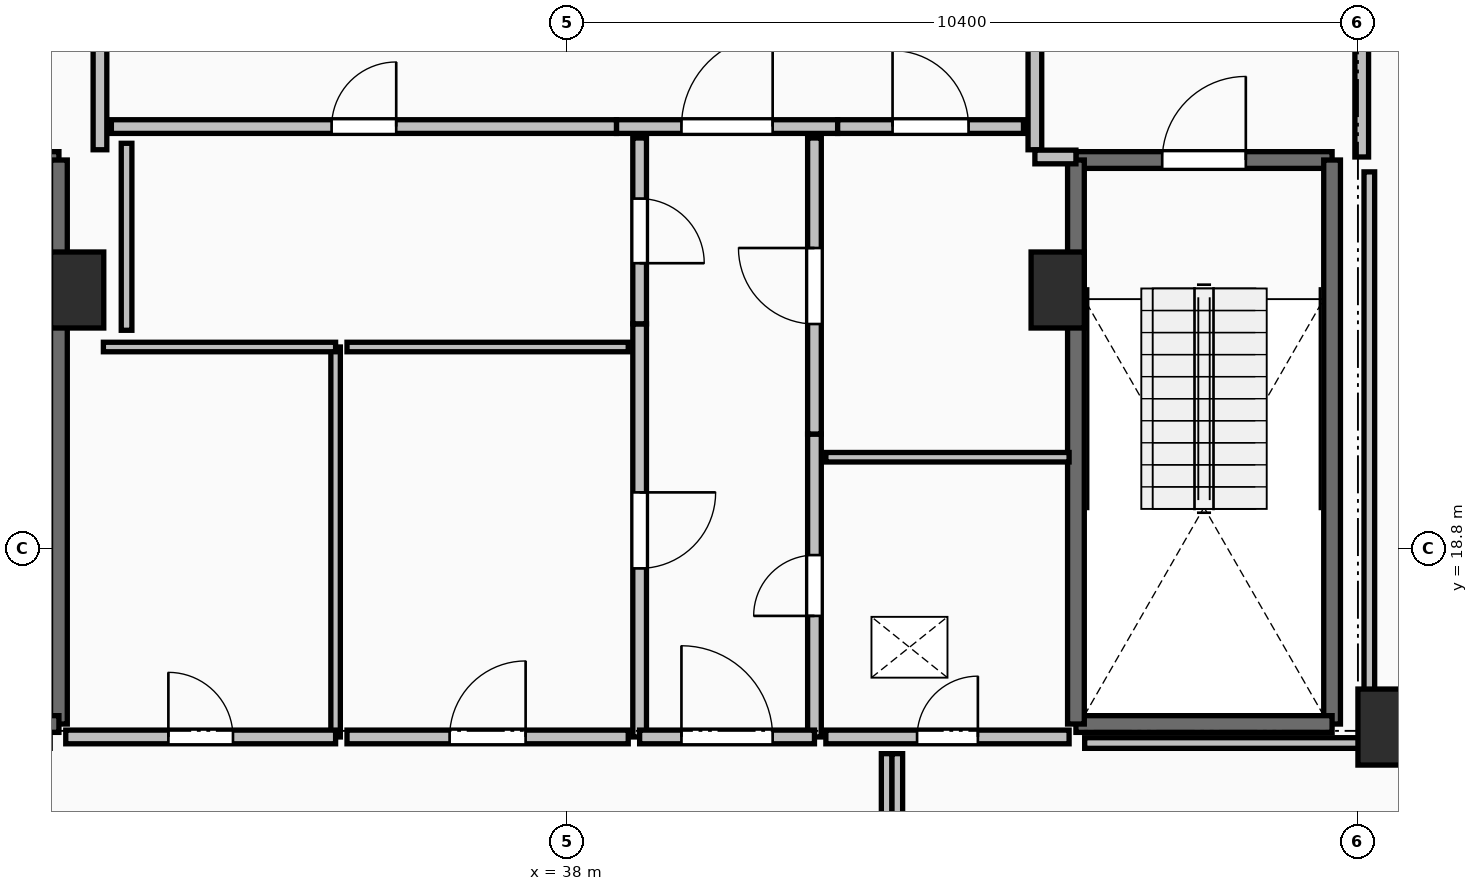
"""IFC4 building model, lengths in metres.
Left out: names, types, materials, properties, quantities, classifications, styles, units other than length and angle.
Written with IfcOpenShell. Run it as: python <this file> out.ifc"""

import sys

from ifc_helpers import new_model, si_unit, direction, frame, frame_2d, origin, origin_2d, place, context, subcontext, project, spatial, rectangle, extrude, element, fill, save


model = new_model("IFC4")
c1 = context("Model", 3, precision=1e-05, world=origin(), true_north=direction((0.0, 1.0)))
c2 = subcontext(c1, "Body", "Model", "MODEL_VIEW")
j1 = project(units=[si_unit("LENGTHUNIT", "METRE"), si_unit("PLANEANGLEUNIT", "RADIAN")], contexts=[c1])
p1 = place(None, origin())
s1 = spatial("IfcSite", under=j1, at=p1, CompositionType="ELEMENT")
p2 = place(p1, origin())
s2 = spatial("IfcBuilding", under=s1, at=p2, CompositionType="ELEMENT")
p3 = place(p2, frame((0.0, 0.0, 248.45)))
s3 = spatial("IfcBuildingStorey", under=s2, at=p3, CompositionType="ELEMENT", Elevation=248.45)
for number, where, z_axis, x_axis in (
    (1, (31.55, 22.2, 0.0), (0.0, 0.0, 1.0), (1.0, 0.0, 0.0)),
    (2, (48.75, 16.45, 0.0), (0.0, 0.0, 1.0), (1.0, 0.0, 0.0)),
    (3, (44.45, 22.2, 0.0), (0.0, 0.0, 1.0), (1.0, 0.0, 0.0)),
):
    element("IfcColumn", number, at=place(p3, frame(where, z_axis=z_axis, x_axis=x_axis)), inside=s3, PredefinedType="PILASTER", context=c2, shape_type="SweptSolid", body=[
        extrude(rectangle(XDim=0.7, YDim=1.0, at=origin_2d()), origin(), (0.0, 0.0, 1.0), 3.55),
    ])
p4 = place(p3, frame((27.94, 23.91, 0.0), z_axis=(0.0, 0.0, 1.0), x_axis=(1.0, 0.0, 0.0)))
e4 = element("IfcWall", 4, at=p4, inside=s3, PredefinedType="SOLIDWALL", context=c2, shape_type="SweptSolid", body=[
    extrude(rectangle(XDim=3.37, YDim=0.22, at=frame_2d((1.685, 0.0))), origin(), (0.0, 0.0, 1.0), 3.29),
])
p5 = place(p4, frame((1.135, 0.0, 0.0)))
e5 = element("IfcOpeningElement", 5, at=p5, cuts=e4, PredefinedType="OPENING", context=c2, shape_type="SweptSolid", body=[
    extrude(rectangle(XDim=1.1, YDim=2.15, at=frame_2d((0.55, 1.075))), frame((0.0, 0.125, 0.0), z_axis=(0.0, -1.0, 0.0), x_axis=(1.0, 0.0, 0.0)), (0.0, 0.0, 1.0), 0.25),
])
p6 = place(p3, frame((31.31, 23.91, 0.0), z_axis=(0.0, 0.0, 1.0), x_axis=(0.0, -1.0, 0.0)))
e6 = element("IfcWall", 6, at=p6, inside=s3, PredefinedType="SOLIDWALL", context=c2, shape_type="SweptSolid", body=[
    extrude(rectangle(XDim=7.42, YDim=0.22, at=frame_2d((3.71, 0.0))), origin(), (0.0, 0.0, 1.0), 3.29),
])
p7 = place(p3, frame((31.31, 16.49, 0.0), z_axis=(0.0, 0.0, 1.0), x_axis=(-1.0, 0.0, 0.0)))
e7 = element("IfcWall", 7, at=p7, inside=s3, PredefinedType="SOLIDWALL", context=c2, shape_type="SweptSolid", body=[
    extrude(rectangle(XDim=3.37, YDim=0.22, at=frame_2d((1.685, 0.0))), origin(), (0.0, 0.0, 1.0), 3.29),
])
p8 = place(p3, frame((44.69, 23.91, 0.0), z_axis=(0.0, 0.0, 1.0), x_axis=(1.0, 0.0, 0.0)))
e8 = element("IfcWall", 8, at=p8, inside=s3, PredefinedType="SOLIDWALL", context=c2, shape_type="SweptSolid", body=[
    extrude(rectangle(XDim=3.37, YDim=0.22, at=frame_2d((1.685, 0.0))), origin(), (0.0, 0.0, 1.0), 3.29),
])
p9 = place(p8, frame((1.135, 0.0, 0.0)))
e9 = element("IfcOpeningElement", 9, at=p9, cuts=e8, PredefinedType="OPENING", context=c2, shape_type="SweptSolid", body=[
    extrude(rectangle(XDim=1.1, YDim=2.15, at=frame_2d((0.55, 1.075))), frame((0.0, 0.125, 0.0), z_axis=(0.0, -1.0, 0.0), x_axis=(1.0, 0.0, 0.0)), (0.0, 0.0, 1.0), 0.25),
])
p10 = place(p3, frame((48.06, 23.91, 0.0), z_axis=(0.0, 0.0, 1.0), x_axis=(0.0, -1.0, 0.0)))
e10 = element("IfcWall", 10, at=p10, inside=s3, PredefinedType="SOLIDWALL", context=c2, shape_type="SweptSolid", body=[
    extrude(rectangle(XDim=7.42, YDim=0.22, at=frame_2d((3.71, 0.0))), origin(), (0.0, 0.0, 1.0), 3.29),
])
p11 = place(p3, frame((48.06, 16.49, 0.0), z_axis=(0.0, 0.0, 1.0), x_axis=(-1.0, 0.0, 0.0)))
e11 = element("IfcWall", 11, at=p11, inside=s3, PredefinedType="SOLIDWALL", context=c2, shape_type="SweptSolid", body=[
    extrude(rectangle(XDim=3.37, YDim=0.22, at=frame_2d((1.685, 0.0))), origin(), (0.0, 0.0, 1.0), 3.29),
])
p12 = place(p3, frame((44.69, 16.49, 0.0), z_axis=(0.0, 0.0, 1.0), x_axis=(0.0, 1.0, 0.0)))
e12 = element("IfcWall", 12, at=p12, inside=s3, PredefinedType="SOLIDWALL", context=c2, shape_type="SweptSolid", body=[
    extrude(rectangle(XDim=7.42, YDim=0.22, at=frame_2d((3.71, 0.0))), origin(), (0.0, 0.0, 1.0), 3.29),
])
p13 = place(p3, frame((31.85, 24.045, 0.0), z_axis=(0.0, 0.0, 1.0), x_axis=(0.0, 1.0, 0.0)))
e13 = element("IfcWall", 13, at=p13, inside=s3, PredefinedType="PARTITIONING", context=c2, shape_type="SweptSolid", body=[
    extrude(rectangle(XDim=3.91, YDim=0.18, at=frame_2d((1.955, 0.0))), origin(), (0.0, 0.0, 1.0), 3.29),
])
p14 = place(p13, frame((1.355, 0.0, 0.0)))
e14 = element("IfcOpeningElement", 14, at=p14, cuts=e13, PredefinedType="OPENING", context=c2, shape_type="SweptSolid", body=[
    extrude(rectangle(XDim=1.2, YDim=2.15, at=frame_2d((0.6, 1.075))), frame((0.0, 0.105, 0.0), z_axis=(0.0, -1.0, 0.0), x_axis=(1.0, 0.0, 0.0)), (0.0, 0.0, 1.0), 0.21),
])
p15 = place(p3, frame((44.15, 27.955, 0.0), z_axis=(0.0, 0.0, 1.0), x_axis=(0.0, -1.0, 0.0)))
e15 = element("IfcWall", 15, at=p15, inside=s3, PredefinedType="PARTITIONING", context=c2, shape_type="SweptSolid", body=[
    extrude(rectangle(XDim=3.91, YDim=0.18, at=frame_2d((1.955, 0.0))), origin(), (0.0, 0.0, 1.0), 3.29),
])
p16 = place(p15, frame((1.355, 0.0, 0.0)))
e16 = element("IfcOpeningElement", 16, at=p16, cuts=e15, PredefinedType="OPENING", context=c2, shape_type="SweptSolid", body=[
    extrude(rectangle(XDim=1.2, YDim=2.15, at=frame_2d((0.6, 1.075))), frame((0.0, 0.105, 0.0), z_axis=(0.0, -1.0, 0.0), x_axis=(1.0, 0.0, 0.0)), (0.0, 0.0, 1.0), 0.21),
])
p17 = place(p3, frame((44.15, 23.95, 0.0), z_axis=(0.0, 0.0, 1.0), x_axis=(1.0, 0.0, 0.0)))
e17 = element("IfcWall", 17, at=p17, inside=s3, PredefinedType="PARTITIONING", context=c2, shape_type="SweptSolid", body=[
    extrude(rectangle(XDim=0.54, YDim=0.18, at=frame_2d((0.27, 0.0))), origin(), (0.0, 0.0, 1.0), 3.29),
])
p18 = place(p3, frame((48.45, 23.95, 0.0), z_axis=(0.0, 0.0, 1.0), x_axis=(0.0, 1.0, 0.0)))
e18 = element("IfcWall", 18, at=p18, inside=s3, PredefinedType="PARTITIONING", context=c2, shape_type="SweptSolid", body=[
    extrude(rectangle(XDim=4.05, YDim=0.18, at=frame_2d((2.025, 0.0))), origin(), (0.0, 0.0, 1.0), 3.29),
])
p19 = place(p18, frame((1.425, 0.0, 0.0)))
e19 = element("IfcOpeningElement", 19, at=p19, cuts=e18, PredefinedType="OPENING", context=c2, shape_type="SweptSolid", body=[
    extrude(rectangle(XDim=1.2, YDim=2.15, at=frame_2d((0.6, 1.075))), frame((0.0, 0.105, 0.0), z_axis=(0.0, -1.0, 0.0), x_axis=(1.0, 0.0, 0.0)), (0.0, 0.0, 1.0), 0.21),
])
p20 = place(p3, frame((38.645, 24.35, 0.0), z_axis=(0.0, 0.0, 1.0), x_axis=(1.0, 0.0, 0.0)))
e20 = element("IfcWall", 20, at=p20, inside=s3, PredefinedType="PARTITIONING", context=c2, shape_type="SweptSolid", body=[
    extrude(rectangle(XDim=2.91, YDim=0.18, at=frame_2d((1.455, 0.0))), origin(), (0.0, 0.0, 1.0), 3.29),
])
p21 = place(p20, frame((0.855, 0.0, 0.0)))
e21 = element("IfcOpeningElement", 21, at=p21, cuts=e20, PredefinedType="OPENING", context=c2, shape_type="SweptSolid", body=[
    extrude(rectangle(XDim=1.2, YDim=2.15, at=frame_2d((0.6, 1.075))), frame((0.0, 0.105, 0.0), z_axis=(0.0, -1.0, 0.0), x_axis=(1.0, 0.0, 0.0)), (0.0, 0.0, 1.0), 0.21),
])
p22 = place(p3, frame((41.555, 24.35, 0.0), z_axis=(0.0, 0.0, 1.0), x_axis=(1.0, 0.0, 0.0)))
e22 = element("IfcWall", 22, at=p22, inside=s3, PredefinedType="PARTITIONING", context=c2, shape_type="SweptSolid", body=[
    extrude(rectangle(XDim=2.445, YDim=0.18, at=frame_2d((1.223, 0.0))), origin(), (0.0, 0.0, 1.0), 3.29),
])
p23 = place(p22, frame((0.722, 0.0, 0.0)))
e23 = element("IfcOpeningElement", 23, at=p23, cuts=e22, PredefinedType="OPENING", context=c2, shape_type="SweptSolid", body=[
    extrude(rectangle(XDim=1.0, YDim=2.15, at=frame_2d((0.5, 1.075))), frame((0.0, 0.105, 0.0), z_axis=(0.0, -1.0, 0.0), x_axis=(1.0, 0.0, 0.0)), (0.0, 0.0, 1.0), 0.21),
])
p24 = place(p3, frame((32.0, 24.35, 0.0), z_axis=(0.0, 0.0, 1.0), x_axis=(1.0, 0.0, 0.0)))
e24 = element("IfcWall", 24, at=p24, inside=s3, PredefinedType="PARTITIONING", context=c2, shape_type="SweptSolid", body=[
    extrude(rectangle(XDim=6.645, YDim=0.18, at=frame_2d((3.323, 0.0))), origin(), (0.0, 0.0, 1.0), 3.29),
])
p25 = place(p24, frame((2.897, 0.0, 0.0)))
e25 = element("IfcOpeningElement", 25, at=p25, cuts=e24, PredefinedType="OPENING", context=c2, shape_type="SweptSolid", body=[
    extrude(rectangle(XDim=0.85, YDim=2.1, at=frame_2d((0.425, 1.05))), frame((0.0, 0.105, 0.0), z_axis=(0.0, -1.0, 0.0), x_axis=(1.0, 0.0, 0.0)), (0.0, 0.0, 1.0), 0.21),
])
p26 = place(p3, frame((41.25, 16.32, 0.0), z_axis=(0.0, 0.0, 1.0), x_axis=(0.0, 1.0, 0.0)))
e26 = element("IfcWall", 26, at=p26, inside=s3, PredefinedType="PARTITIONING", context=c2, shape_type="SweptSolid", body=[
    extrude(rectangle(XDim=3.985, YDim=0.18, at=frame_2d((1.992, 0.0))), origin(), (0.0, 0.0, 1.0), 3.29),
])
p27 = place(p26, frame((1.593, 0.0, 0.0)))
e27 = element("IfcOpeningElement", 27, at=p27, cuts=e26, PredefinedType="OPENING", context=c2, shape_type="SweptSolid", body=[
    extrude(rectangle(XDim=0.8, YDim=2.05, at=frame_2d((0.4, 1.025))), frame((0.0, 0.105, 0.0), z_axis=(0.0, -1.0, 0.0), x_axis=(1.0, 0.0, 0.0)), (0.0, 0.0, 1.0), 0.21),
])
p28 = place(p3, frame((41.25, 20.305, 0.0), z_axis=(0.0, 0.0, 1.0), x_axis=(0.0, 1.0, 0.0)))
e28 = element("IfcWall", 28, at=p28, inside=s3, PredefinedType="PARTITIONING", context=c2, shape_type="SweptSolid", body=[
    extrude(rectangle(XDim=3.895, YDim=0.18, at=frame_2d((1.948, 0.0))), origin(), (0.0, 0.0, 1.0), 2.482),
])
p29 = place(p28, frame((1.448, 0.0, 0.0)))
e29 = element("IfcOpeningElement", 29, at=p29, cuts=e28, PredefinedType="OPENING", context=c2, shape_type="SweptSolid", body=[
    extrude(rectangle(XDim=1.0, YDim=2.15, at=frame_2d((0.5, 1.075))), frame((0.0, 0.105, 0.0), z_axis=(0.0, -1.0, 0.0), x_axis=(1.0, 0.0, 0.0)), (0.0, 0.0, 1.0), 0.21),
])
p30 = place(p3, frame((38.95, 21.755, 0.0), z_axis=(0.0, 0.0, 1.0), x_axis=(0.0, -1.0, 0.0)))
e30 = element("IfcWall", 30, at=p30, inside=s3, PredefinedType="PARTITIONING", context=c2, shape_type="SweptSolid", body=[
    extrude(rectangle(XDim=5.435, YDim=0.18, at=frame_2d((2.717, 0.0))), origin(), (0.0, 0.0, 1.0), 3.29),
])
p31 = place(p30, frame((2.218, 0.0, 0.0)))
e31 = element("IfcOpeningElement", 31, at=p31, cuts=e30, PredefinedType="OPENING", context=c2, shape_type="SweptSolid", body=[
    extrude(rectangle(XDim=1.0, YDim=2.15, at=frame_2d((0.5, 1.075))), frame((0.0, 0.105, 0.0), z_axis=(0.0, -1.0, 0.0), x_axis=(1.0, 0.0, 0.0)), (0.0, 0.0, 1.0), 0.21),
])
p32 = place(p3, frame((38.95, 24.2, 0.0), z_axis=(0.0, 0.0, 1.0), x_axis=(0.0, -1.0, 0.0)))
e32 = element("IfcWall", 32, at=p32, inside=s3, PredefinedType="PARTITIONING", context=c2, shape_type="SweptSolid", body=[
    extrude(rectangle(XDim=2.445, YDim=0.18, at=frame_2d((1.223, 0.0))), origin(), (0.0, 0.0, 1.0), 2.482),
])
p33 = place(p32, frame((0.798, 0.0, 0.0)))
e33 = element("IfcOpeningElement", 33, at=p33, cuts=e32, PredefinedType="OPENING", context=c2, shape_type="SweptSolid", body=[
    extrude(rectangle(XDim=0.85, YDim=2.1, at=frame_2d((0.425, 1.05))), frame((0.0, 0.105, 0.0), z_axis=(0.0, -1.0, 0.0), x_axis=(1.0, 0.0, 0.0)), (0.0, 0.0, 1.0), 0.21),
])
p34 = place(p3, frame((38.95, 16.32, 0.0), z_axis=(0.0, 0.0, 1.0), x_axis=(1.0, 0.0, 0.0)))
e34 = element("IfcWall", 34, at=p34, inside=s3, PredefinedType="PARTITIONING", context=c2, shape_type="SweptSolid", body=[
    extrude(rectangle(XDim=2.3, YDim=0.18, at=frame_2d((1.15, 0.0))), origin(), (0.0, 0.0, 1.0), 3.29),
])
p35 = place(p34, frame((0.55, 0.0, 0.0)))
e35 = element("IfcOpeningElement", 35, at=p35, cuts=e34, PredefinedType="OPENING", context=c2, shape_type="SweptSolid", body=[
    extrude(rectangle(XDim=1.2, YDim=2.15, at=frame_2d((0.6, 1.075))), frame((0.0, 0.105, 0.0), z_axis=(0.0, -1.0, 0.0), x_axis=(1.0, 0.0, 0.0)), (0.0, 0.0, 1.0), 0.21),
])
p36 = place(p3, frame((44.6, 20.0, 0.0), z_axis=(0.0, 0.0, 1.0), x_axis=(-1.0, 0.0, 0.0)))
e36 = element("IfcWall", 36, at=p36, inside=s3, PredefinedType="PARTITIONING", context=c2, shape_type="SweptSolid", body=[
    extrude(rectangle(XDim=3.2, YDim=0.125, at=frame_2d((1.6, 0.0))), origin(), (0.0, 0.0, 1.0), 3.29),
])
p37 = place(p3, frame((41.4, 16.32, 0.0), z_axis=(0.0, 0.0, 1.0), x_axis=(1.0, 0.0, 0.0)))
e37 = element("IfcWall", 37, at=p37, inside=s3, PredefinedType="PARTITIONING", context=c2, shape_type="SweptSolid", body=[
    extrude(rectangle(XDim=3.2, YDim=0.18, at=frame_2d((1.6, 0.0))), origin(), (0.0, 0.0, 1.0), 3.29),
])
p38 = place(p37, frame((1.2, 0.0, 0.0)))
e38 = element("IfcOpeningElement", 38, at=p38, cuts=e37, PredefinedType="OPENING", context=c2, shape_type="SweptSolid", body=[
    extrude(rectangle(XDim=0.8, YDim=2.05, at=frame_2d((0.4, 1.025))), frame((0.0, 0.105, 0.0), z_axis=(0.0, -1.0, 0.0), x_axis=(1.0, 0.0, 0.0)), (0.0, 0.0, 1.0), 0.21),
])
p39 = place(p3, frame((34.95, 16.32, 0.0), z_axis=(0.0, 0.0, 1.0), x_axis=(0.0, 1.0, 0.0)))
e39 = element("IfcWall", 39, at=p39, inside=s3, PredefinedType="PARTITIONING", context=c2, shape_type="SweptSolid", body=[
    extrude(rectangle(XDim=5.13, YDim=0.125, at=frame_2d((2.565, 0.0))), origin(), (0.0, 0.0, 1.0), 3.29),
])
p40 = place(p3, frame((34.95, 21.45, 0.0), z_axis=(0.0, 0.0, 1.0), x_axis=(-1.0, 0.0, 0.0)))
e40 = element("IfcWall", 40, at=p40, inside=s3, PredefinedType="PARTITIONING", context=c2, shape_type="SweptSolid", body=[
    extrude(rectangle(XDim=3.055, YDim=0.125, at=frame_2d((1.527, 0.0))), origin(), (0.0, 0.0, 1.0), 3.29),
])
p41 = place(p3, frame((31.4, 16.32, 0.0), z_axis=(0.0, 0.0, 1.0), x_axis=(1.0, 0.0, 0.0)))
e41 = element("IfcWall", 41, at=p41, inside=s3, PredefinedType="PARTITIONING", context=c2, shape_type="SweptSolid", body=[
    extrude(rectangle(XDim=3.55, YDim=0.18, at=frame_2d((1.775, 0.0))), origin(), (0.0, 0.0, 1.0), 3.29),
])
p42 = place(p41, frame((1.35, 0.0, 0.0)))
e42 = element("IfcOpeningElement", 42, at=p42, cuts=e41, PredefinedType="OPENING", context=c2, shape_type="SweptSolid", body=[
    extrude(rectangle(XDim=0.85, YDim=2.1, at=frame_2d((0.425, 1.05))), frame((0.0, 0.105, 0.0), z_axis=(0.0, -1.0, 0.0), x_axis=(1.0, 0.0, 0.0)), (0.0, 0.0, 1.0), 0.21),
])
p43 = place(p3, frame((38.8, 21.45, 0.0), z_axis=(0.0, 0.0, 1.0), x_axis=(-1.0, 0.0, 0.0)))
e43 = element("IfcWall", 43, at=p43, inside=s3, PredefinedType="PARTITIONING", context=c2, shape_type="SweptSolid", body=[
    extrude(rectangle(XDim=3.7, YDim=0.125, at=frame_2d((1.85, 0.0))), origin(), (0.0, 0.0, 1.0), 3.29),
])
p44 = place(p3, frame((35.1, 16.32, 0.0), z_axis=(0.0, 0.0, 1.0), x_axis=(1.0, 0.0, 0.0)))
e44 = element("IfcWall", 44, at=p44, inside=s3, PredefinedType="PARTITIONING", context=c2, shape_type="SweptSolid", body=[
    extrude(rectangle(XDim=3.7, YDim=0.18, at=frame_2d((1.85, 0.0))), origin(), (0.0, 0.0, 1.0), 3.29),
])
p45 = place(p44, frame((1.35, 0.0, 0.0)))
e45 = element("IfcOpeningElement", 45, at=p45, cuts=e44, PredefinedType="OPENING", context=c2, shape_type="SweptSolid", body=[
    extrude(rectangle(XDim=1.0, YDim=2.15, at=frame_2d((0.5, 1.075))), frame((0.0, 0.105, 0.0), z_axis=(0.0, -1.0, 0.0), x_axis=(1.0, 0.0, 0.0)), (0.0, 0.0, 1.0), 0.21),
])
p46 = place(p3, frame((32.2, 24.13, 0.0), z_axis=(0.0, 0.0, 1.0), x_axis=(0.0, -1.0, 0.0)))
e46 = element("IfcWall", 46, at=p46, inside=s3, PredefinedType="PARTITIONING", context=c2, shape_type="SweptSolid", body=[
    extrude(rectangle(XDim=2.46, YDim=0.14, at=frame_2d((1.23, 0.0))), origin(), (0.0, 0.0, 1.0), 2.482),
])
p47 = place(p3, frame((44.805, 16.24, 0.0), z_axis=(0.0, 0.0, 1.0), x_axis=(1.0, 0.0, 0.0)))
e47 = element("IfcWall", 47, at=p47, inside=s3, PredefinedType="PARTITIONING", context=c2, shape_type="SweptSolid", body=[
    extrude(rectangle(XDim=3.745, YDim=0.14, at=frame_2d((1.873, 0.0))), origin(), (0.0, 0.0, 1.0), 2.482),
])
p48 = place(p3, frame((48.55, 16.24, 0.0), z_axis=(0.0, 0.0, 1.0), x_axis=(0.0, 1.0, 0.0)))
e48 = element("IfcWall", 48, at=p48, inside=s3, PredefinedType="PARTITIONING", context=c2, shape_type="SweptSolid", body=[
    extrude(rectangle(XDim=7.514, YDim=0.14, at=frame_2d((3.757, 0.0))), origin(), (0.0, 0.0, 1.0), 2.482),
])
for number, where, z_axis, x_axis in (
    (49, (42.2, 16.1, 0.0), (0.0, 0.0, 1.0), (0.0, -1.0, 0.0)),
    (50, (42.34, 14.27, 0.0), (0.0, 0.0, 1.0), (0.0, 1.0, 0.0)),
):
    element("IfcWall", number, at=place(p3, frame(where, z_axis=z_axis, x_axis=x_axis)), inside=s3, PredefinedType="PARTITIONING", context=c2, shape_type="SweptSolid", body=[
        extrude(rectangle(XDim=1.83, YDim=0.14, at=frame_2d((0.915, 0.0))), origin(), (0.0, 0.0, 1.0), 3.022),
    ])
p49 = place(p9, origin())
e51 = element("IfcDoor", 51, at=p49, inside=s3, OperationType="SINGLE_SWING_RIGHT", PredefinedType="DOOR", context=c2, shape_type="SweptSolid", body=[
    extrude(rectangle(XDim=1.1, YDim=2.15, at=frame_2d((0.55, 1.075))), frame((0.0, 0.025, 0.0), z_axis=(0.0, -1.0, 0.0), x_axis=(1.0, 0.0, 0.0)), (0.0, 0.0, 1.0), 0.05),
])
fill(e9, e51)
p50 = place(p21, origin())
e52 = element("IfcDoor", 52, at=p50, inside=s3, OperationType="SINGLE_SWING_RIGHT", PredefinedType="DOOR", context=c2, shape_type="SweptSolid", body=[
    extrude(rectangle(XDim=1.2, YDim=2.15, at=frame_2d((0.6, 1.075))), frame((0.0, 0.025, 0.0), z_axis=(0.0, -1.0, 0.0), x_axis=(1.0, 0.0, 0.0)), (0.0, 0.0, 1.0), 0.05),
])
fill(e21, e52)
p51 = place(p23, origin())
e53 = element("IfcDoor", 53, at=p51, inside=s3, OperationType="SINGLE_SWING_LEFT", PredefinedType="DOOR", context=c2, shape_type="SweptSolid", body=[
    extrude(rectangle(XDim=1.0, YDim=2.15, at=frame_2d((0.5, 1.075))), frame((0.0, 0.025, 0.0), z_axis=(0.0, -1.0, 0.0), x_axis=(1.0, 0.0, 0.0)), (0.0, 0.0, 1.0), 0.05),
])
fill(e23, e53)
p52 = place(p25, origin())
e54 = element("IfcDoor", 54, at=p52, inside=s3, OperationType="SINGLE_SWING_RIGHT", PredefinedType="DOOR", context=c2, shape_type="SweptSolid", body=[
    extrude(rectangle(XDim=0.85, YDim=2.1, at=frame_2d((0.425, 1.05))), frame((0.0, 0.025, 0.0), z_axis=(0.0, -1.0, 0.0), x_axis=(1.0, 0.0, 0.0)), (0.0, 0.0, 1.0), 0.05),
])
fill(e25, e54)
p53 = place(p27, origin())
e55 = element("IfcDoor", 55, at=p53, inside=s3, OperationType="SINGLE_SWING_LEFT", PredefinedType="DOOR", context=c2, shape_type="SweptSolid", body=[
    extrude(rectangle(XDim=0.8, YDim=2.05, at=frame_2d((0.4, 1.025))), frame((0.0, 0.025, 0.0), z_axis=(0.0, -1.0, 0.0), x_axis=(1.0, 0.0, 0.0)), (0.0, 0.0, 1.0), 0.05),
])
fill(e27, e55)
p54 = place(p29, origin())
e56 = element("IfcDoor", 56, at=p54, inside=s3, OperationType="SINGLE_SWING_RIGHT", PredefinedType="DOOR", context=c2, shape_type="SweptSolid", body=[
    extrude(rectangle(XDim=1.0, YDim=2.15, at=frame_2d((0.5, 1.075))), frame((0.0, 0.025, 0.0), z_axis=(0.0, -1.0, 0.0), x_axis=(1.0, 0.0, 0.0)), (0.0, 0.0, 1.0), 0.05),
])
fill(e29, e56)
p55 = place(p31, origin())
e57 = element("IfcDoor", 57, at=p55, inside=s3, OperationType="SINGLE_SWING_LEFT", PredefinedType="DOOR", context=c2, shape_type="SweptSolid", body=[
    extrude(rectangle(XDim=1.0, YDim=2.15, at=frame_2d((0.5, 1.075))), frame((0.0, 0.025, 0.0), z_axis=(0.0, -1.0, 0.0), x_axis=(1.0, 0.0, 0.0)), (0.0, 0.0, 1.0), 0.05),
])
fill(e31, e57)
p56 = place(p33, origin())
e58 = element("IfcDoor", 58, at=p56, inside=s3, OperationType="SINGLE_SWING_RIGHT", PredefinedType="DOOR", context=c2, shape_type="SweptSolid", body=[
    extrude(rectangle(XDim=0.85, YDim=2.1, at=frame_2d((0.425, 1.05))), frame((0.0, 0.025, 0.0), z_axis=(0.0, -1.0, 0.0), x_axis=(1.0, 0.0, 0.0)), (0.0, 0.0, 1.0), 0.05),
])
fill(e33, e58)
p57 = place(p35, origin())
e59 = element("IfcDoor", 59, at=p57, inside=s3, OperationType="SINGLE_SWING_LEFT", PredefinedType="DOOR", context=c2, shape_type="SweptSolid", body=[
    extrude(rectangle(XDim=1.2, YDim=2.15, at=frame_2d((0.6, 1.075))), frame((0.0, 0.025, 0.0), z_axis=(0.0, -1.0, 0.0), x_axis=(1.0, 0.0, 0.0)), (0.0, 0.0, 1.0), 0.05),
])
fill(e35, e59)
p58 = place(p38, origin())
e60 = element("IfcDoor", 60, at=p58, inside=s3, OperationType="SINGLE_SWING_RIGHT", PredefinedType="DOOR", context=c2, shape_type="SweptSolid", body=[
    extrude(rectangle(XDim=0.8, YDim=2.05, at=frame_2d((0.4, 1.025))), frame((0.0, 0.025, 0.0), z_axis=(0.0, -1.0, 0.0), x_axis=(1.0, 0.0, 0.0)), (0.0, 0.0, 1.0), 0.05),
])
fill(e38, e60)
p59 = place(p42, origin())
e61 = element("IfcDoor", 61, at=p59, inside=s3, OperationType="SINGLE_SWING_LEFT", PredefinedType="DOOR", context=c2, shape_type="SweptSolid", body=[
    extrude(rectangle(XDim=0.85, YDim=2.1, at=frame_2d((0.425, 1.05))), frame((0.0, 0.025, 0.0), z_axis=(0.0, -1.0, 0.0), x_axis=(1.0, 0.0, 0.0)), (0.0, 0.0, 1.0), 0.05),
])
fill(e42, e61)
p60 = place(p45, origin())
e62 = element("IfcDoor", 62, at=p60, inside=s3, OperationType="SINGLE_SWING_RIGHT", PredefinedType="DOOR", context=c2, shape_type="SweptSolid", body=[
    extrude(rectangle(XDim=1.0, YDim=2.15, at=frame_2d((0.5, 1.075))), frame((0.0, 0.025, 0.0), z_axis=(0.0, -1.0, 0.0), x_axis=(1.0, 0.0, 0.0)), (0.0, 0.0, 1.0), 0.05),
])
fill(e45, e62)
save(model, sys.argv[1])
